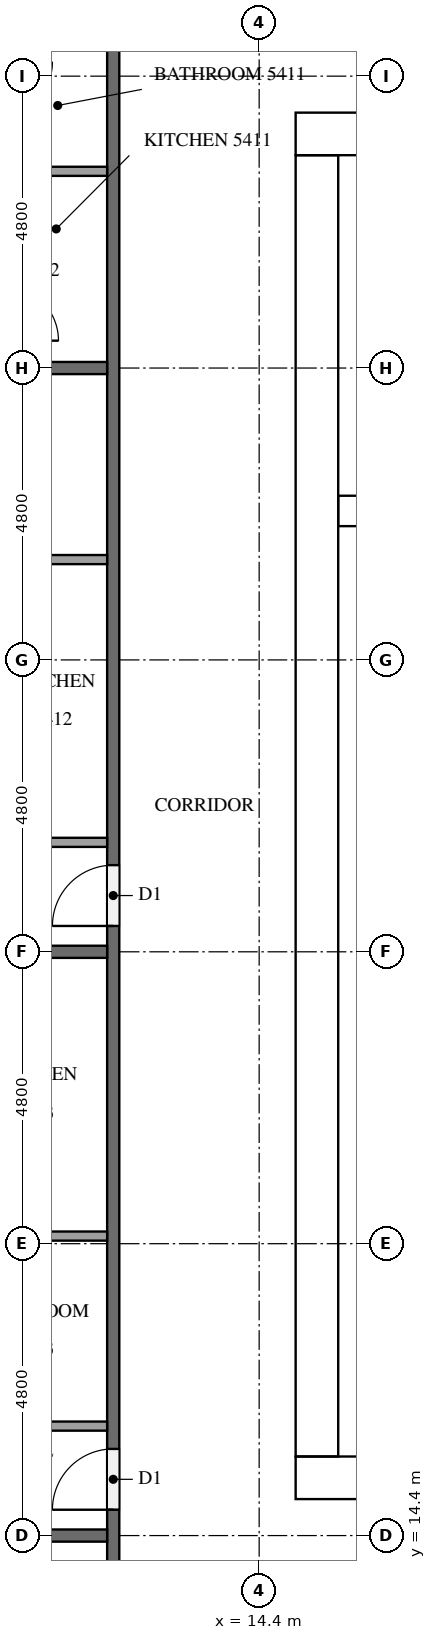
"""IFC4 building model, lengths in metres.
Left out: names, types, materials, properties, quantities, classifications, styles, units other than length and angle.
Written with IfcOpenShell. Run it as: python <this file> out.ifc"""

import sys

from ifc_helpers import new_model, si_unit, direction, frame, frame_2d, origin, place, context, subcontext, project, spatial, rectangle, extrude, element, fill, save


model = new_model("IFC4")
c1 = context("Model", 3, precision=1e-05, world=origin(), true_north=direction((0.0, 1.0)))
c2 = subcontext(c1, "Body", "Model", "MODEL_VIEW")
j1 = project(units=[si_unit("LENGTHUNIT", "METRE"), si_unit("PLANEANGLEUNIT", "RADIAN")], contexts=[c1])
p1 = place(None, origin())
s1 = spatial("IfcSite", under=j1, at=p1, CompositionType="ELEMENT")
p2 = place(p1, origin())
s2 = spatial("IfcBuilding", under=s1, at=p2, CompositionType="ELEMENT")
p3 = place(p2, frame((0.0, 0.0, 208.8)))
s3 = spatial("IfcBuildingStorey", under=s2, at=p3, CompositionType="ELEMENT", Elevation=208.8)
p4 = place(p3, frame((15.0, 15.35, 0.0), z_axis=(0.0, 0.0, 1.0), x_axis=(1.0, 0.0, 0.0)))
e1 = element("IfcWall", 1, at=p4, inside=s3, PredefinedType="SHEAR", context=c2, shape_type="SweptSolid", body=[
    extrude(rectangle(XDim=32.4, YDim=0.7, at=frame_2d((16.2, 0.0))), origin(), (0.0, 0.0, 1.0), 3.2),
])
p5 = place(p4, frame((15.3, 0.0, 0.0)))
e2 = element("IfcOpeningElement", 2, at=p5, cuts=e1, PredefinedType="OPENING", context=c2, shape_type="SweptSolid", body=[
    extrude(rectangle(XDim=1.8, YDim=2.1, at=frame_2d((0.9, 1.05))), frame((0.0, 0.36, 0.0), z_axis=(0.0, -1.0, 0.0), x_axis=(1.0, 0.0, 0.0)), (0.0, 0.0, 1.0), 0.72),
])
p6 = place(p3, frame((15.0, 37.45, 0.0), z_axis=(0.0, 0.0, 1.0), x_axis=(1.0, 0.0, 0.0)))
e3 = element("IfcWall", 3, at=p6, inside=s3, PredefinedType="SHEAR", context=c2, shape_type="SweptSolid", body=[
    extrude(rectangle(XDim=32.4, YDim=0.7, at=frame_2d((16.2, 0.0))), origin(), (0.0, 0.0, 1.0), 3.2),
])
p7 = place(p6, frame((15.3, 0.0, 0.0)))
e4 = element("IfcOpeningElement", 4, at=p7, cuts=e3, PredefinedType="OPENING", context=c2, shape_type="SweptSolid", body=[
    extrude(rectangle(XDim=1.8, YDim=2.1, at=frame_2d((0.9, 1.05))), frame((0.0, 0.36, 0.0), z_axis=(0.0, -1.0, 0.0), x_axis=(1.0, 0.0, 0.0)), (0.0, 0.0, 1.0), 0.72),
])
p8 = place(p6, frame((1.544, 0.0, 0.0)))
e5 = element("IfcOpeningElement", 5, at=p8, cuts=e3, PredefinedType="OPENING", context=c2, shape_type="SweptSolid", body=[
    extrude(rectangle(XDim=1.0, YDim=2.1, at=frame_2d((0.5, 1.05))), frame((0.0, 0.36, 0.0), z_axis=(0.0, -1.0, 0.0), x_axis=(1.0, 0.0, 0.0)), (0.0, 0.0, 1.0), 0.72),
])
p9 = place(p6, frame((5.219, 0.0, 0.0)))
e6 = element("IfcOpeningElement", 6, at=p9, cuts=e3, PredefinedType="OPENING", context=c2, shape_type="SweptSolid", body=[
    extrude(rectangle(XDim=1.0, YDim=2.1, at=frame_2d((0.5, 1.05))), frame((0.0, 0.36, 0.0), z_axis=(0.0, -1.0, 0.0), x_axis=(1.0, 0.0, 0.0)), (0.0, 0.0, 1.0), 0.72),
])
p10 = place(p3, frame((15.35, 15.7, 0.0), z_axis=(0.0, 0.0, 1.0), x_axis=(0.0, 1.0, 0.0)))
e7 = element("IfcWall", 7, at=p10, inside=s3, PredefinedType="SHEAR", context=c2, shape_type="SweptSolid", body=[
    extrude(rectangle(XDim=21.4, YDim=0.7, at=frame_2d((10.7, 0.0))), origin(), (0.0, 0.0, 1.0), 3.2),
])
p11 = place(p10, frame((5.06, 0.0, 0.0)))
e8 = element("IfcOpeningElement", 8, at=p11, cuts=e7, PredefinedType="OPENING", context=c2, shape_type="SweptSolid", body=[
    extrude(rectangle(XDim=1.2, YDim=2.1, at=frame_2d((0.6, 1.05))), frame((0.0, 0.36, 0.0), z_axis=(0.0, -1.0, 0.0), x_axis=(1.0, 0.0, 0.0)), (0.0, 0.0, 1.0), 0.72),
])
p12 = place(p3, frame((15.7, 31.25, 0.0), z_axis=(0.0, 0.0, 1.0), x_axis=(1.0, 0.0, 0.0)))
e9 = element("IfcWall", 9, at=p12, inside=s3, PredefinedType="SHEAR", context=c2, shape_type="SweptSolid", body=[
    extrude(rectangle(XDim=7.15, YDim=0.5, at=frame_2d((3.575, 0.0))), origin(), (0.0, 0.0, 1.0), 3.2),
])
p13 = place(p3, frame((12.0, 12.1, 0.0), z_axis=(0.0, 0.0, 1.0), x_axis=(0.0, 1.0, 0.0)))
e10 = element("IfcWall", 10, at=p13, inside=s3, PredefinedType="PARTITIONING", context=c2, shape_type="SweptSolid", body=[
    extrude(rectangle(XDim=28.6, YDim=0.2, at=frame_2d((14.3, 0.0))), origin(), (0.0, 0.0, 1.0), 3.2),
])
p14 = place(p13, frame((27.275, 0.0, 0.0)))
e11 = element("IfcOpeningElement", 11, at=p14, cuts=e10, PredefinedType="OPENING", context=c2, shape_type="SweptSolid", body=[
    extrude(rectangle(XDim=1.0, YDim=2.1, at=frame_2d((0.5, 1.05))), frame((0.0, 0.11, 0.0), z_axis=(0.0, -1.0, 0.0), x_axis=(1.0, 0.0, 0.0)), (0.0, 0.0, 1.0), 0.22),
])
p15 = place(p13, frame((12.325, 0.0, 0.0)))
e12 = element("IfcOpeningElement", 12, at=p15, cuts=e10, PredefinedType="OPENING", context=c2, shape_type="SweptSolid", body=[
    extrude(rectangle(XDim=1.0, YDim=2.1, at=frame_2d((0.5, 1.05))), frame((0.0, 0.11, 0.0), z_axis=(0.0, -1.0, 0.0), x_axis=(1.0, 0.0, 0.0)), (0.0, 0.0, 1.0), 0.22),
])
p16 = place(p13, frame((2.725, 0.0, 0.0)))
e13 = element("IfcOpeningElement", 13, at=p16, cuts=e10, PredefinedType="OPENING", context=c2, shape_type="SweptSolid", body=[
    extrude(rectangle(XDim=1.0, YDim=2.1, at=frame_2d((0.5, 1.05))), frame((0.0, 0.11, 0.0), z_axis=(0.0, -1.0, 0.0), x_axis=(1.0, 0.0, 0.0)), (0.0, 0.0, 1.0), 0.22),
])
p17 = place(p13, frame((0.875, 0.0, 0.0)))
e14 = element("IfcOpeningElement", 14, at=p17, cuts=e10, PredefinedType="OPENING", context=c2, shape_type="SweptSolid", body=[
    extrude(rectangle(XDim=1.0, YDim=2.1, at=frame_2d((0.5, 1.05))), frame((0.0, 0.11, 0.0), z_axis=(0.0, -1.0, 0.0), x_axis=(1.0, 0.0, 0.0)), (0.0, 0.0, 1.0), 0.22),
])
for number, where, z_axis, x_axis in (
    (15, (4.9, 33.6, 0.0), (0.0, 0.0, 1.0), (1.0, 0.0, 0.0)),
    (16, (4.9, 24.0, 0.0), (0.0, 0.0, 1.0), (1.0, 0.0, 0.0)),
    (17, (4.9, 14.4, 0.0), (0.0, 0.0, 1.0), (1.0, 0.0, 0.0)),
):
    element("IfcWall", number, at=place(p3, frame(where, z_axis=z_axis, x_axis=x_axis)), inside=s3, PredefinedType="PARTITIONING", context=c2, shape_type="SweptSolid", body=[
        extrude(rectangle(XDim=7.0, YDim=0.2, at=frame_2d((3.5, 0.0))), origin(), (0.0, 0.0, 1.0), 3.2),
    ])
p18 = place(p3, frame((11.9, 36.835, 0.0), z_axis=(0.0, 0.0, 1.0), x_axis=(-1.0, 0.0, 0.0)))
e18 = element("IfcWall", 18, at=p18, inside=s3, PredefinedType="PARTITIONING", context=c2, shape_type="SweptSolid", body=[
    extrude(rectangle(XDim=1.625, YDim=0.15, at=frame_2d((0.812, 0.0))), origin(), (0.0, 0.0, 1.0), 3.2),
])
p19 = place(p3, frame((11.9, 30.45, 0.0), z_axis=(0.0, 0.0, 1.0), x_axis=(-1.0, 0.0, 0.0)))
e19 = element("IfcWall", 19, at=p19, inside=s3, PredefinedType="PARTITIONING", context=c2, shape_type="SweptSolid", body=[
    extrude(rectangle(XDim=1.775, YDim=0.15, at=frame_2d((0.887, 0.0))), origin(), (0.0, 0.0, 1.0), 3.2),
])
p20 = place(p3, frame((11.9, 25.8, 0.0), z_axis=(0.0, 0.0, 1.0), x_axis=(-1.0, 0.0, 0.0)))
e20 = element("IfcWall", 20, at=p20, inside=s3, PredefinedType="PARTITIONING", context=c2, shape_type="SweptSolid", body=[
    extrude(rectangle(XDim=1.925, YDim=0.15, at=frame_2d((0.962, 0.0))), origin(), (0.0, 0.0, 1.0), 3.2),
])
p21 = place(p3, frame((11.9, 19.325, 0.0), z_axis=(0.0, 0.0, 1.0), x_axis=(-1.0, 0.0, 0.0)))
e21 = element("IfcWall", 21, at=p21, inside=s3, PredefinedType="PARTITIONING", context=c2, shape_type="SweptSolid", body=[
    extrude(rectangle(XDim=2.375, YDim=0.15, at=frame_2d((1.188, 0.0))), origin(), (0.0, 0.0, 1.0), 3.2),
])
p22 = place(p3, frame((11.9, 16.2, 0.0), z_axis=(0.0, 0.0, 1.0), x_axis=(-1.0, 0.0, 0.0)))
e22 = element("IfcWall", 22, at=p22, inside=s3, PredefinedType="PARTITIONING", context=c2, shape_type="SweptSolid", body=[
    extrude(rectangle(XDim=2.525, YDim=0.15, at=frame_2d((1.262, 0.0))), origin(), (0.0, 0.0, 1.0), 3.2),
])
p23 = place(p11, frame((1.2, 0.0, 0.0), z_axis=(0.0, 0.0, 1.0), x_axis=(-1.0, 0.0, 0.0)))
e23 = element("IfcDoor", 23, at=p23, inside=s3, OperationType="SINGLE_SWING_LEFT", PredefinedType="DOOR", context=c2, shape_type="SweptSolid", body=[
    extrude(rectangle(XDim=1.2, YDim=2.1, at=frame_2d((0.6, 1.05))), frame((0.0, 0.025, 0.0), z_axis=(0.0, -1.0, 0.0), x_axis=(1.0, 0.0, 0.0)), (0.0, 0.0, 1.0), 0.05),
])
fill(e8, e23)
p24 = place(p15, origin())
e24 = element("IfcDoor", 24, at=p24, inside=s3, OperationType="SINGLE_SWING_LEFT", PredefinedType="DOOR", context=c2, shape_type="SweptSolid", body=[
    extrude(rectangle(XDim=1.0, YDim=2.1, at=frame_2d((0.5, 1.05))), frame((0.0, 0.025, 0.0), z_axis=(0.0, -1.0, 0.0), x_axis=(1.0, 0.0, 0.0)), (0.0, 0.0, 1.0), 0.05),
])
fill(e12, e24)
p25 = place(p16, origin())
e25 = element("IfcDoor", 25, at=p25, inside=s3, OperationType="SINGLE_SWING_LEFT", PredefinedType="DOOR", context=c2, shape_type="SweptSolid", body=[
    extrude(rectangle(XDim=1.0, YDim=2.1, at=frame_2d((0.5, 1.05))), frame((0.0, 0.025, 0.0), z_axis=(0.0, -1.0, 0.0), x_axis=(1.0, 0.0, 0.0)), (0.0, 0.0, 1.0), 0.05),
])
fill(e13, e25)
save(model, sys.argv[1])
